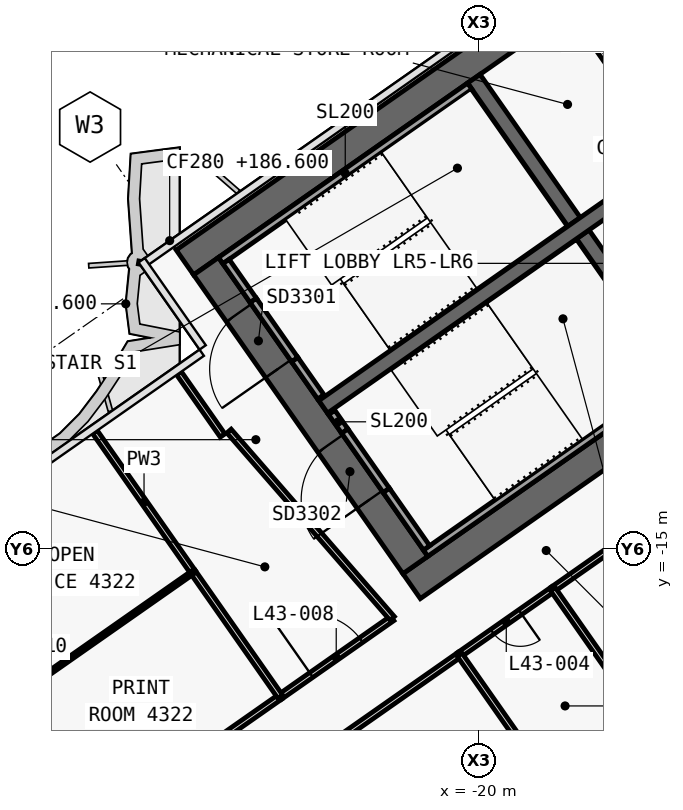
"""IFC4 building model, lengths in metres.
Left out: names, types, materials, properties, quantities, classifications, styles, units other than length and angle.
Written with IfcOpenShell. Run it as: python <this file> out.ifc"""

import sys

from ifc_helpers import new_model, si_unit, direction, frame, frame_2d, origin, place, context, subcontext, project, spatial, polyline, rectangle, outline, extrude, element, fill, save


model = new_model("IFC4")
c1 = context("Model", 3, precision=1e-05, world=origin(), true_north=direction((0.0, 1.0)))
c2 = subcontext(c1, "Body", "Model", "MODEL_VIEW")
j1 = project(units=[si_unit("LENGTHUNIT", "METRE"), si_unit("PLANEANGLEUNIT", "RADIAN")], contexts=[c1])
p1 = place(None, origin())
s1 = spatial("IfcSite", under=j1, at=p1, CompositionType="ELEMENT")
p2 = place(p1, origin())
s2 = spatial("IfcBuilding", under=s1, at=p2, CompositionType="ELEMENT")
p3 = place(p2, frame((0.0, 0.0, 186.6)))
s3 = spatial("IfcBuildingStorey", under=s2, at=p3, CompositionType="ELEMENT", Elevation=186.6)
p4 = place(p3, frame((0.029, 11.984, 0.0), z_axis=(0.0, 0.0, 1.0), x_axis=(-0.819151382952, -0.573577380837, 0.0)))
e1 = element("IfcWall", 1, at=p4, inside=s3, PredefinedType="SHEAR", context=c2, shape_type="SweptSolid", body=[
    extrude(outline(polyline([(33.898, 0.4), (0.56, 0.4), (-0.0, -0.4), (33.898, -0.4), (33.898, 0.4)])), origin(), (0.0, 0.0, 1.0), 3.9),
])
p5 = place(p3, frame((0.029, -0.712, 0.0), z_axis=(0.0, 0.0, 1.0), x_axis=(-0.819151758019, -0.573576845187, 0.0)))
e2 = element("IfcWall", 2, at=p5, inside=s3, PredefinedType="SHEAR", context=c2, shape_type="SweptSolid", body=[
    extrude(outline(polyline([(26.616, 0.4), (0.56, 0.4), (-0.0, -0.4), (26.616, -0.4), (26.616, 0.4)])), origin(), (0.0, 0.0, 1.0), 3.9),
])
p6 = place(p5, frame((2.966, 0.0, 0.0)))
e3 = element("IfcOpeningElement", 3, at=p6, cuts=e2, PredefinedType="OPENING", context=c2, shape_type="SweptSolid", body=[
    extrude(rectangle(XDim=2.4, YDim=2.1, at=frame_2d((1.2, 1.05))), frame((0.0, 0.41, 0.0), z_axis=(0.0, -1.0, 0.0), x_axis=(1.0, 0.0, 0.0)), (0.0, 0.0, 1.0), 0.82),
])
p7 = place(p5, frame((11.916, 0.0, 0.0)))
e4 = element("IfcOpeningElement", 4, at=p7, cuts=e2, PredefinedType="OPENING", context=c2, shape_type="SweptSolid", body=[
    extrude(rectangle(XDim=2.4, YDim=2.1, at=frame_2d((1.2, 1.05))), frame((0.0, 0.41, 0.0), z_axis=(0.0, -1.0, 0.0), x_axis=(1.0, 0.0, 0.0)), (0.0, 0.0, 1.0), 0.82),
])
p8 = place(p3, frame((-21.675, -15.421, 0.0), z_axis=(0.0, 0.0, 1.0), x_axis=(-0.573581815061, 0.819148278049, 0.0)))
e5 = element("IfcWall", 5, at=p8, inside=s3, PredefinedType="SHEAR", context=c2, shape_type="SweptSolid", body=[
    extrude(outline(polyline([(0.0, 0.4), (0.0, -0.4), (9.6, -0.4), (9.6, 0.4), (0.0, 0.4)])), origin(), (0.0, 0.0, 1.0), 3.9),
])
p9 = place(p8, frame((6.3, 0.0, 0.0)))
e6 = element("IfcOpeningElement", 6, at=p9, cuts=e5, PredefinedType="OPENING", context=c2, shape_type="SweptSolid", body=[
    extrude(rectangle(XDim=1.8, YDim=2.1, at=frame_2d((0.9, 1.05))), frame((0.0, 0.41, 0.0), z_axis=(0.0, -1.0, 0.0), x_axis=(1.0, 0.0, 0.0)), (0.0, 0.0, 1.0), 0.82),
])
p10 = place(p8, frame((2.1, 0.0, 0.0)))
e7 = element("IfcOpeningElement", 7, at=p10, cuts=e5, PredefinedType="OPENING", context=c2, shape_type="SweptSolid", body=[
    extrude(rectangle(XDim=1.8, YDim=2.1, at=frame_2d((0.9, 1.05))), frame((0.0, 0.41, 0.0), z_axis=(0.0, -1.0, 0.0), x_axis=(1.0, 0.0, 0.0)), (0.0, 0.0, 1.0), 0.82),
])
p11 = place(p3, frame((-14.63, -10.488, 0.0), z_axis=(0.0, 0.0, 1.0), x_axis=(-0.573611936273, 0.819127185829, 0.0)))
e8 = element("IfcWall", 8, at=p11, inside=s3, PredefinedType="SHEAR", context=c2, shape_type="SweptSolid", body=[
    extrude(outline(polyline([(4.6, 0.2), (0.0, 0.2), (0.0, -0.2), (4.6, -0.2), (4.6, 0.2)])), origin(), (0.0, 0.0, 1.0), 3.9),
])
p12 = place(p3, frame((-17.498, -6.392, 0.0), z_axis=(0.0, 0.0, 1.0), x_axis=(-0.573611936273, 0.819127185829, 0.0)))
e9 = element("IfcWall", 9, at=p12, inside=s3, PredefinedType="SHEAR", context=c2, shape_type="SweptSolid", body=[
    extrude(outline(polyline([(4.6, -0.2), (4.6, 0.2), (0.0, 0.2), (0.0, -0.2), (4.6, -0.2)])), origin(), (0.0, 0.0, 1.0), 3.9),
])
p13 = place(p3, frame((-2.638, 3.768, 0.0), z_axis=(0.0, 0.0, 1.0), x_axis=(-0.81915267502, -0.573575535572, 0.0)))
e10 = element("IfcWall", 10, at=p13, inside=s3, PredefinedType="SHEAR", context=c2, shape_type="SweptSolid", body=[
    extrude(outline(polyline([(26.2, 0.2), (0.0, 0.2), (0.0, -0.2), (26.2, -0.2), (26.2, 0.2)])), origin(), (0.0, 0.0, 1.0), 3.9),
])
p14 = place(p13, frame((1.169, 0.0, 0.0)))
e11 = element("IfcOpeningElement", 11, at=p14, cuts=e10, PredefinedType="OPENING", context=c2, shape_type="SweptSolid", body=[
    extrude(rectangle(XDim=1.1, YDim=2.1, at=frame_2d((0.55, 1.05))), frame((0.0, 0.21, 0.0), z_axis=(0.0, -1.0, 0.0), x_axis=(1.0, 0.0, 0.0)), (0.0, 0.0, 1.0), 0.42),
])
p15 = place(p13, frame((3.206, 0.0, 0.0)))
e12 = element("IfcOpeningElement", 12, at=p15, cuts=e10, PredefinedType="OPENING", context=c2, shape_type="SweptSolid", body=[
    extrude(rectangle(XDim=1.1, YDim=2.1, at=frame_2d((0.55, 1.05))), frame((0.0, 0.21, 0.0), z_axis=(0.0, -1.0, 0.0), x_axis=(1.0, 0.0, 0.0)), (0.0, 0.0, 1.0), 0.42),
])
p16 = place(p13, frame((5.244, 0.0, 0.0)))
e13 = element("IfcOpeningElement", 13, at=p16, cuts=e10, PredefinedType="OPENING", context=c2, shape_type="SweptSolid", body=[
    extrude(rectangle(XDim=1.1, YDim=2.1, at=frame_2d((0.55, 1.05))), frame((0.0, 0.21, 0.0), z_axis=(0.0, -1.0, 0.0), x_axis=(1.0, 0.0, 0.0)), (0.0, 0.0, 1.0), 0.42),
])
p17 = place(p13, frame((7.281, 0.0, 0.0)))
e14 = element("IfcOpeningElement", 14, at=p17, cuts=e10, PredefinedType="OPENING", context=c2, shape_type="SweptSolid", body=[
    extrude(rectangle(XDim=1.1, YDim=2.1, at=frame_2d((0.55, 1.05))), frame((0.0, 0.21, 0.0), z_axis=(0.0, -1.0, 0.0), x_axis=(1.0, 0.0, 0.0)), (0.0, 0.0, 1.0), 0.42),
])
p18 = place(p13, frame((9.688, 0.0, 0.0)))
e15 = element("IfcOpeningElement", 15, at=p18, cuts=e10, PredefinedType="OPENING", context=c2, shape_type="SweptSolid", body=[
    extrude(rectangle(XDim=1.1, YDim=2.1, at=frame_2d((0.55, 1.05))), frame((0.0, 0.21, 0.0), z_axis=(0.0, -1.0, 0.0), x_axis=(1.0, 0.0, 0.0)), (0.0, 0.0, 1.0), 0.42),
])
p19 = place(p13, frame((11.863, 0.0, 0.0)))
e16 = element("IfcOpeningElement", 16, at=p19, cuts=e10, PredefinedType="OPENING", context=c2, shape_type="SweptSolid", body=[
    extrude(rectangle(XDim=1.1, YDim=2.1, at=frame_2d((0.55, 1.05))), frame((0.0, 0.21, 0.0), z_axis=(0.0, -1.0, 0.0), x_axis=(1.0, 0.0, 0.0)), (0.0, 0.0, 1.0), 0.42),
])
p20 = place(p13, frame((13.722, 0.0, 0.0)))
e17 = element("IfcOpeningElement", 17, at=p20, cuts=e10, PredefinedType="OPENING", context=c2, shape_type="SweptSolid", body=[
    extrude(rectangle(XDim=1.0, YDim=2.1, at=frame_2d((0.5, 1.05))), frame((0.0, 0.21, 0.0), z_axis=(0.0, -1.0, 0.0), x_axis=(1.0, 0.0, 0.0)), (0.0, 0.0, 1.0), 0.42),
])
p21 = place(p13, frame((15.798, 0.0, 0.0)))
e18 = element("IfcOpeningElement", 18, at=p21, cuts=e10, PredefinedType="OPENING", context=c2, shape_type="SweptSolid", body=[
    extrude(rectangle(XDim=1.0, YDim=2.1, at=frame_2d((0.5, 1.05))), frame((0.0, 0.21, 0.0), z_axis=(0.0, -1.0, 0.0), x_axis=(1.0, 0.0, 0.0)), (0.0, 0.0, 1.0), 0.42),
])
p22 = place(p3, frame((-14.926, -4.591, 0.0), z_axis=(0.0, 0.0, 1.0), x_axis=(-0.573576324356, 0.819152122709, 0.0)))
e19 = element("IfcWall", 19, at=p22, inside=s3, PredefinedType="PARTITIONING", context=c2, shape_type="SweptSolid", body=[
    extrude(rectangle(XDim=4.6, YDim=0.15, at=frame_2d((2.3, 0.0))), origin(), (0.0, 0.0, 1.0), 3.62),
])
p23 = place(p3, frame((-20.243, -2.821, 0.0), z_axis=(0.0, 0.0, 1.0), x_axis=(-0.819141584393, -0.57359137434, 0.0)))
e20 = element("IfcWall", 20, at=p23, inside=s3, PredefinedType="SOLIDWALL", context=c2, shape_type="SweptSolid", body=[
    extrude(rectangle(XDim=8.0, YDim=0.2, at=frame_2d((4.0, 0.0))), origin(), (0.0, 0.0, 1.0), 3.62),
])
p24 = place(p3, frame((-24.162, -10.998, 0.0), z_axis=(0.0, 0.0, 1.0), x_axis=(-0.573612502218, 0.819126789514, 0.0)))
e21 = element("IfcWall", 21, at=p24, inside=s3, PredefinedType="SOLIDWALL", context=c2, shape_type="SweptSolid", body=[
    extrude(rectangle(XDim=1.2, YDim=0.2, at=frame_2d((0.6, 0.0))), origin(), (0.0, 0.0, 1.0), 3.62),
])
p25 = place(p3, frame((-25.94, -8.458, 0.0), z_axis=(0.0, 0.0, 1.0), x_axis=(-0.573619628835, 0.819121798889, 0.0)))
e22 = element("IfcWall", 22, at=p25, inside=s3, PredefinedType="SOLIDWALL", context=c2, shape_type="SweptSolid", body=[
    extrude(rectangle(XDim=1.25, YDim=0.2, at=frame_2d((0.625, 0.0))), origin(), (0.0, 0.0, 1.0), 3.62),
])
p26 = place(p3, frame((-24.85, -10.014, 2.15), z_axis=(0.0, 0.0, 1.0), x_axis=(-0.573505465124, 0.819201734296, 0.0)))
e23 = element("IfcWall", 23, at=p26, inside=s3, PredefinedType="SOLIDWALL", context=c2, shape_type="SweptSolid", body=[
    extrude(rectangle(XDim=1.9, YDim=0.2, at=frame_2d((0.95, 0.0))), origin(), (0.0, 0.0, 1.0), 1.47),
])
p27 = place(p3, frame((-14.851, -10.521, 0.0), z_axis=(0.0, 0.0, 1.0), x_axis=(-0.819141584393, -0.57359137434, 0.0)))
e24 = element("IfcWall", 24, at=p27, inside=s3, PredefinedType="SOLIDWALL", context=c2, shape_type="SweptSolid", body=[
    extrude(rectangle(XDim=8.0, YDim=0.2, at=frame_2d((4.0, 0.0))), origin(), (0.0, 0.0, 1.0), 3.62),
])
p28 = place(p3, frame((-21.38, -14.97, 0.0), z_axis=(0.0, 0.0, 1.0), x_axis=(-0.573559770908, 0.819163713305, 0.0)))
e25 = element("IfcWall", 25, at=p28, inside=s3, PredefinedType="SOLIDWALL", context=c2, shape_type="SweptSolid", body=[
    extrude(rectangle(XDim=1.85, YDim=0.2, at=frame_2d((0.925, 0.0))), origin(), (0.0, 0.0, 1.0), 3.62),
])
p29 = place(p3, frame((-23.531, -11.898, 0.0), z_axis=(0.0, 0.0, 1.0), x_axis=(-0.573708088123, 0.819059844958, 0.0)))
e26 = element("IfcWall", 26, at=p29, inside=s3, PredefinedType="SOLIDWALL", context=c2, shape_type="SweptSolid", body=[
    extrude(rectangle(XDim=0.6, YDim=0.2, at=frame_2d((0.3, 0.0))), origin(), (0.0, 0.0, 1.0), 3.62),
])
p30 = place(p3, frame((-22.441, -13.455, 2.15), z_axis=(0.0, 0.0, 1.0), x_axis=(-0.573591692345, 0.819141361715, 0.0)))
e27 = element("IfcWall", 27, at=p30, inside=s3, PredefinedType="SOLIDWALL", context=c2, shape_type="SweptSolid", body=[
    extrude(rectangle(XDim=1.9, YDim=0.2, at=frame_2d((0.95, 0.0))), origin(), (0.0, 0.0, 1.0), 1.47),
])
p31 = place(p3, frame((-25.231, -18.888, 0.0), z_axis=(0.0, 0.0, 1.0), x_axis=(0.819152236293, 0.573576162141, 0.0)))
e28 = element("IfcWall", 28, at=p31, inside=s3, PredefinedType="PARTITIONING", context=c2, shape_type="SweptSolid", body=[
    extrude(rectangle(XDim=3.599, YDim=0.15, at=frame_2d((1.799, 0.0))), origin(), (0.0, 0.0, 1.0), 3.0),
])
p32 = place(p31, frame((1.0, 0.0, 0.0)))
e29 = element("IfcOpeningElement", 29, at=p32, cuts=e28, PredefinedType="OPENING", context=c2, shape_type="SweptSolid", body=[
    extrude(rectangle(XDim=1.6, YDim=2.1, at=frame_2d((0.8, 1.05))), frame((0.0, 0.085, 0.0), z_axis=(0.0, -1.0, 0.0), x_axis=(1.0, 0.0, 0.0)), (0.0, 0.0, 1.0), 0.17),
])
p33 = place(p3, frame((-33.445, -24.64, 0.0), z_axis=(0.0, 0.0, 1.0), x_axis=(0.819143874627, 0.57358810366, 0.0)))
e30 = element("IfcWall", 30, at=p33, inside=s3, PredefinedType="PARTITIONING", context=c2, shape_type="SweptSolid", body=[
    extrude(rectangle(XDim=10.032, YDim=0.15, at=frame_2d((5.016, 0.0))), origin(), (0.0, 0.0, 1.0), 3.0),
])
p34 = place(p33, frame((2.516, 0.0, 0.0)))
e31 = element("IfcOpeningElement", 31, at=p34, cuts=e30, PredefinedType="OPENING", context=c2, shape_type="SweptSolid", body=[
    extrude(rectangle(XDim=1.6, YDim=2.1, at=frame_2d((0.8, 1.05))), frame((0.0, 0.085, 0.0), z_axis=(0.0, -1.0, 0.0), x_axis=(1.0, 0.0, 0.0)), (0.0, 0.0, 1.0), 0.17),
])
p35 = place(p3, frame((-9.451, -10.036, 0.0), z_axis=(0.0, 0.0, 1.0), x_axis=(-0.819164214721, -0.57355905478, 0.0)))
e32 = element("IfcWall", 32, at=p35, inside=s3, PredefinedType="PARTITIONING", context=c2, shape_type="SweptSolid", body=[
    extrude(rectangle(XDim=10.504, YDim=0.15, at=frame_2d((5.252, 0.0))), origin(), (0.0, 0.0, 1.0), 3.0),
])
p36 = place(p35, frame((4.452, 0.0, 0.0)))
e33 = element("IfcOpeningElement", 33, at=p36, cuts=e32, PredefinedType="OPENING", context=c2, shape_type="SweptSolid", body=[
    extrude(rectangle(XDim=1.6, YDim=2.1, at=frame_2d((0.8, 1.05))), frame((0.0, 0.085, 0.0), z_axis=(0.0, -1.0, 0.0), x_axis=(1.0, 0.0, 0.0)), (0.0, 0.0, 1.0), 0.17),
])
p37 = place(p3, frame((-18.052, -16.058, 0.0), z_axis=(0.0, 0.0, 1.0), x_axis=(-0.819128818764, -0.573609604409, 0.0)))
e34 = element("IfcWall", 34, at=p37, inside=s3, PredefinedType="PARTITIONING", context=c2, shape_type="SweptSolid", body=[
    extrude(rectangle(XDim=3.004, YDim=0.15, at=frame_2d((1.502, 0.0))), origin(), (0.0, 0.0, 1.0), 3.0),
])
p38 = place(p37, frame((1.052, 0.0, 0.0)))
e35 = element("IfcOpeningElement", 35, at=p38, cuts=e34, PredefinedType="OPENING", context=c2, shape_type="SweptSolid", body=[
    extrude(rectangle(XDim=0.9, YDim=2.1, at=frame_2d((0.45, 1.05))), frame((0.0, 0.085, 0.0), z_axis=(0.0, -1.0, 0.0), x_axis=(1.0, 0.0, 0.0)), (0.0, 0.0, 1.0), 0.17),
])
p39 = place(p3, frame((-20.51, -17.779, 0.0), z_axis=(0.0, 0.0, 1.0), x_axis=(-0.819145647741, -0.57358557146, 0.0)))
e36 = element("IfcWall", 36, at=p39, inside=s3, PredefinedType="PARTITIONING", context=c2, shape_type="SweptSolid", body=[
    extrude(rectangle(XDim=10.504, YDim=0.15, at=frame_2d((5.252, 0.0))), origin(), (0.0, 0.0, 1.0), 3.0),
])
p40 = place(p39, frame((4.452, 0.0, 0.0)))
e37 = element("IfcOpeningElement", 37, at=p40, cuts=e36, PredefinedType="OPENING", context=c2, shape_type="SweptSolid", body=[
    extrude(rectangle(XDim=1.6, YDim=2.1, at=frame_2d((0.8, 1.05))), frame((0.0, 0.085, 0.0), z_axis=(0.0, -1.0, 0.0), x_axis=(1.0, 0.0, 0.0)), (0.0, 0.0, 1.0), 0.17),
])
p41 = place(p3, frame((-26.746, -12.014, 0.0), z_axis=(0.0, 0.0, 1.0), x_axis=(-0.573568836472, 0.819157365729, 0.0)))
e38 = element("IfcWall", 38, at=p41, inside=s3, PredefinedType="PARTITIONING", context=c2, shape_type="SweptSolid", body=[
    extrude(rectangle(XDim=2.0, YDim=0.15, at=frame_2d((1.0, 0.0))), origin(), (0.0, 0.0, 1.0), 3.0),
])
p42 = place(p3, frame((-22.284, -16.826, 0.0), z_axis=(0.0, 0.0, 1.0), x_axis=(-0.656758142177, 0.754101281449, 0.0)))
e39 = element("IfcWall", 39, at=p42, inside=s3, PredefinedType="PARTITIONING", context=c2, shape_type="SweptSolid", body=[
    extrude(rectangle(XDim=6.539, YDim=0.15, at=frame_2d((3.269, 0.0))), origin(), (0.0, 0.0, 1.0), 3.0),
])
p43 = place(p3, frame((-27.523, -15.611, 0.0), z_axis=(0.0, 0.0, 1.0), x_axis=(-0.573556991349, 0.819165659482, 0.0)))
e40 = element("IfcWall", 40, at=p43, inside=s3, PredefinedType="PARTITIONING", context=c2, shape_type="SweptSolid", body=[
    extrude(rectangle(XDim=4.501, YDim=0.15, at=frame_2d((2.25, 0.0))), origin(), (0.0, 0.0, 1.0), 3.0),
])
p44 = place(p3, frame((-25.23, -18.887, 0.0), z_axis=(0.0, 0.0, 1.0), x_axis=(-0.573589265117, 0.819143061341, 0.0)))
e41 = element("IfcWall", 41, at=p44, inside=s3, PredefinedType="PARTITIONING", context=c2, shape_type="SweptSolid", body=[
    extrude(rectangle(XDim=4.002, YDim=0.15, at=frame_2d((2.001, 0.0))), origin(), (0.0, 0.0, 1.0), 3.0),
])
p45 = place(p3, frame((-36.29, -21.747, 0.0), z_axis=(0.0, 0.0, 1.0), x_axis=(0.819153661249, 0.573574127085, 0.0)))
e42 = element("IfcWall", 42, at=p45, inside=s3, PredefinedType="PARTITIONING", context=c2, shape_type="SweptSolid", body=[
    extrude(rectangle(XDim=10.7, YDim=0.1, at=frame_2d((5.35, 0.0))), origin(), (0.0, 0.0, 1.0), 2.9),
])
p46 = place(p45, frame((4.9, 0.0, 0.0)))
e43 = element("IfcOpeningElement", 43, at=p46, cuts=e42, PredefinedType="OPENING", context=c2, shape_type="SweptSolid", body=[
    extrude(rectangle(XDim=0.9, YDim=2.1, at=frame_2d((0.45, 1.05))), frame((0.0, 0.06, 0.0), z_axis=(0.0, -1.0, 0.0), x_axis=(1.0, 0.0, 0.0)), (0.0, 0.0, 1.0), 0.12),
])
p47 = place(p3, frame((-15.186, -20.155, 0.0), z_axis=(0.0, 0.0, 1.0), x_axis=(-0.573586866468, 0.819144740944, 0.0)))
e44 = element("IfcWall", 44, at=p47, inside=s3, PredefinedType="PARTITIONING", context=c2, shape_type="SweptSolid", body=[
    extrude(rectangle(XDim=5.0, YDim=0.15, at=frame_2d((2.5, 0.0))), origin(), (0.0, 0.0, 1.0), 3.62),
])
p48 = place(p3, frame((-18.789, -20.239, 0.0), z_axis=(0.0, 0.0, 1.0), x_axis=(-0.573549676934, 0.819170780783, 0.0)))
e45 = element("IfcWall", 45, at=p48, inside=s3, PredefinedType="PARTITIONING", context=c2, shape_type="SweptSolid", body=[
    extrude(rectangle(XDim=3.002, YDim=0.15, at=frame_2d((1.501, 0.0))), origin(), (0.0, 0.0, 1.0), 3.0),
])
p49 = place(p9, origin())
e46 = element("IfcDoor", 46, at=p49, inside=s3, OperationType="DOUBLE_DOOR_SINGLE_SWING", PredefinedType="DOOR", context=c2, shape_type="SweptSolid", body=[
    extrude(rectangle(XDim=1.8, YDim=2.1, at=frame_2d((0.9, 1.05))), frame((0.0, 0.025, 0.0), z_axis=(0.0, -1.0, 0.0), x_axis=(1.0, 0.0, 0.0)), (0.0, 0.0, 1.0), 0.05),
])
fill(e6, e46)
p50 = place(p10, origin())
e47 = element("IfcDoor", 47, at=p50, inside=s3, OperationType="DOUBLE_DOOR_SINGLE_SWING", PredefinedType="DOOR", context=c2, shape_type="SweptSolid", body=[
    extrude(rectangle(XDim=1.8, YDim=2.1, at=frame_2d((0.9, 1.05))), frame((0.0, 0.025, 0.0), z_axis=(0.0, -1.0, 0.0), x_axis=(1.0, 0.0, 0.0)), (0.0, 0.0, 1.0), 0.05),
])
fill(e7, e47)
p51 = place(p38, origin())
e48 = element("IfcDoor", 48, at=p51, inside=s3, OperationType="SINGLE_SWING_LEFT", PredefinedType="DOOR", context=c2, shape_type="SweptSolid", body=[
    extrude(rectangle(XDim=0.9, YDim=2.1, at=frame_2d((0.45, 1.05))), frame((0.0, 0.025, 0.0), z_axis=(0.0, -1.0, 0.0), x_axis=(1.0, 0.0, 0.0)), (0.0, 0.0, 1.0), 0.05),
])
fill(e35, e48)
p52 = place(p32, origin())
e49 = element("IfcDoor", 49, at=p52, inside=s3, OperationType="DOUBLE_DOOR_SINGLE_SWING", PredefinedType="DOOR", context=c2, shape_type="SweptSolid", body=[
    extrude(rectangle(XDim=1.6, YDim=2.1, at=frame_2d((0.8, 1.05))), frame((0.0, 0.025, 0.0), z_axis=(0.0, -1.0, 0.0), x_axis=(1.0, 0.0, 0.0)), (0.0, 0.0, 1.0), 0.05),
])
fill(e29, e49)
save(model, sys.argv[1])
